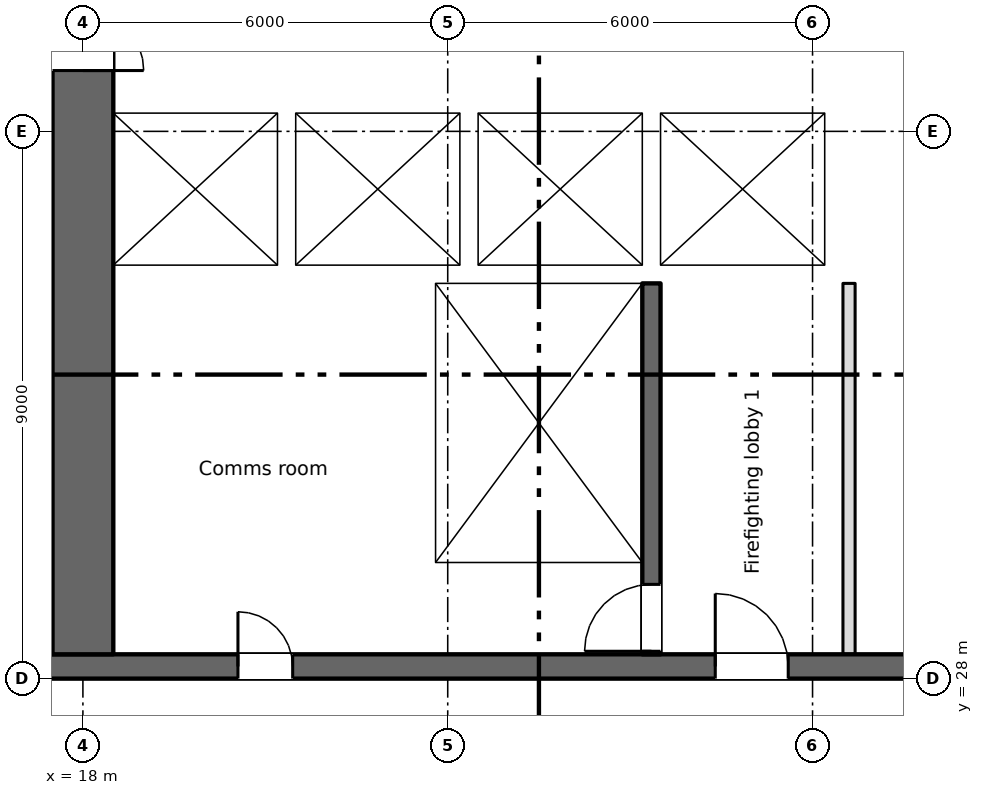
"""IFC4 building model, lengths in metres.
Left out: names, types, materials, properties, quantities, classifications, styles, units other than length and angle.
Written with IfcOpenShell. Run it as: python <this file> out.ifc"""

import sys

from ifc_helpers import new_model, si_unit, direction, frame, frame_2d, origin, place, context, subcontext, project, spatial, rectangle, extrude, element, fill, save


model = new_model("IFC4")
c1 = context("Model", 3, precision=1e-05, world=origin(), true_north=direction((0.0, 1.0)))
c2 = subcontext(c1, "Body", "Model", "MODEL_VIEW")
j1 = project(units=[si_unit("LENGTHUNIT", "METRE"), si_unit("PLANEANGLEUNIT", "RADIAN")], contexts=[c1])
p1 = place(None, origin())
s1 = spatial("IfcSite", under=j1, at=p1, CompositionType="ELEMENT")
p2 = place(p1, origin())
s2 = spatial("IfcBuilding", under=s1, at=p2, CompositionType="ELEMENT")
p3 = place(p2, frame((0.0, 0.0, 56.25)))
s3 = spatial("IfcBuildingStorey", under=s2, at=p3, CompositionType="ELEMENT", Elevation=56.25)
p4 = place(p3, frame((6.7, 28.2, 0.0), z_axis=(0.0, 0.0, 1.0), x_axis=(1.0, 0.0, 0.0)))
e1 = element("IfcWall", 1, at=p4, inside=s3, PredefinedType="SHEAR", context=c2, shape_type="SweptSolid", body=[
    extrude(rectangle(XDim=57.8, YDim=0.4, at=frame_2d((28.9, 0.0))), origin(), (0.0, 0.0, 1.0), 3.35),
])
p5 = place(p4, frame((13.85, 0.0, 0.0)))
e2 = element("IfcOpeningElement", 2, at=p5, cuts=e1, PredefinedType="OPENING", context=c2, shape_type="SweptSolid", body=[
    extrude(rectangle(XDim=0.9, YDim=2.1, at=frame_2d((0.45, 1.05))), frame((0.0, 0.21, 0.0), z_axis=(0.0, -1.0, 0.0), x_axis=(1.0, 0.0, 0.0)), (0.0, 0.0, 1.0), 0.42),
])
p6 = place(p4, frame((48.562, 0.0, 0.0)))
e3 = element("IfcOpeningElement", 3, at=p6, cuts=e1, PredefinedType="OPENING", context=c2, shape_type="SweptSolid", body=[
    extrude(rectangle(XDim=0.9, YDim=2.1, at=frame_2d((0.45, 1.05))), frame((0.0, 0.21, 0.0), z_axis=(0.0, -1.0, 0.0), x_axis=(1.0, 0.0, 0.0)), (0.0, 0.0, 1.0), 0.42),
])
p7 = place(p4, frame((51.137, 0.0, 0.0)))
e4 = element("IfcOpeningElement", 4, at=p7, cuts=e1, PredefinedType="OPENING", context=c2, shape_type="SweptSolid", body=[
    extrude(rectangle(XDim=0.9, YDim=2.1, at=frame_2d((0.45, 1.05))), frame((0.0, 0.21, 0.0), z_axis=(0.0, -1.0, 0.0), x_axis=(1.0, 0.0, 0.0)), (0.0, 0.0, 1.0), 0.42),
])
p8 = place(p4, frame((1.35, 0.0, 0.0)))
e5 = element("IfcOpeningElement", 5, at=p8, cuts=e1, PredefinedType="OPENING", context=c2, shape_type="SweptSolid", body=[
    extrude(rectangle(XDim=0.9, YDim=2.1, at=frame_2d((0.45, 1.05))), frame((0.0, 0.21, 0.0), z_axis=(0.0, -1.0, 0.0), x_axis=(1.0, 0.0, 0.0)), (0.0, 0.0, 1.0), 0.42),
])
p9 = place(p4, frame((4.7, 0.0, 0.0)))
e6 = element("IfcOpeningElement", 6, at=p9, cuts=e1, PredefinedType="OPENING", context=c2, shape_type="SweptSolid", body=[
    extrude(rectangle(XDim=1.2, YDim=2.1, at=frame_2d((0.6, 1.05))), frame((0.0, 0.21, 0.0), z_axis=(0.0, -1.0, 0.0), x_axis=(1.0, 0.0, 0.0)), (0.0, 0.0, 1.0), 0.42),
])
p10 = place(p4, frame((31.7, 0.0, 0.0)))
e7 = element("IfcOpeningElement", 7, at=p10, cuts=e1, PredefinedType="OPENING", context=c2, shape_type="SweptSolid", body=[
    extrude(rectangle(XDim=1.2, YDim=2.1, at=frame_2d((0.6, 1.05))), frame((0.0, 0.21, 0.0), z_axis=(0.0, -1.0, 0.0), x_axis=(1.0, 0.0, 0.0)), (0.0, 0.0, 1.0), 0.42),
])
p11 = place(p4, frame((55.2, 0.0, 0.0)))
e8 = element("IfcOpeningElement", 8, at=p11, cuts=e1, PredefinedType="OPENING", context=c2, shape_type="SweptSolid", body=[
    extrude(rectangle(XDim=1.2, YDim=2.1, at=frame_2d((0.6, 1.05))), frame((0.0, 0.21, 0.0), z_axis=(0.0, -1.0, 0.0), x_axis=(1.0, 0.0, 0.0)), (0.0, 0.0, 1.0), 0.42),
])
p12 = place(p4, frame((21.7, 0.0, 0.0)))
e9 = element("IfcOpeningElement", 9, at=p12, cuts=e1, PredefinedType="OPENING", context=c2, shape_type="SweptSolid", body=[
    extrude(rectangle(XDim=1.2, YDim=2.1, at=frame_2d((0.6, 1.05))), frame((0.0, 0.21, 0.0), z_axis=(0.0, -1.0, 0.0), x_axis=(1.0, 0.0, 0.0)), (0.0, 0.0, 1.0), 0.42),
])
p13 = place(p4, frame((41.7, 0.0, 0.0)))
e10 = element("IfcOpeningElement", 10, at=p13, cuts=e1, PredefinedType="OPENING", context=c2, shape_type="SweptSolid", body=[
    extrude(rectangle(XDim=1.2, YDim=2.1, at=frame_2d((0.6, 1.05))), frame((0.0, 0.21, 0.0), z_axis=(0.0, -1.0, 0.0), x_axis=(1.0, 0.0, 0.0)), (0.0, 0.0, 1.0), 0.42),
])
p14 = place(p4, frame((24.85, 0.0, 0.0)))
e11 = element("IfcOpeningElement", 11, at=p14, cuts=e1, PredefinedType="OPENING", context=c2, shape_type="SweptSolid", body=[
    extrude(rectangle(XDim=2.4, YDim=2.1, at=frame_2d((1.2, 1.05))), frame((0.0, 0.21, 0.0), z_axis=(0.0, -1.0, 0.0), x_axis=(1.0, 0.0, 0.0)), (0.0, 0.0, 1.0), 0.42),
])
p15 = place(p4, frame((37.35, 0.0, 0.0)))
e12 = element("IfcOpeningElement", 12, at=p15, cuts=e1, PredefinedType="OPENING", context=c2, shape_type="SweptSolid", body=[
    extrude(rectangle(XDim=2.4, YDim=2.1, at=frame_2d((1.2, 1.05))), frame((0.0, 0.21, 0.0), z_axis=(0.0, -1.0, 0.0), x_axis=(1.0, 0.0, 0.0)), (0.0, 0.0, 1.0), 0.42),
])
p16 = place(p4, frame((7.85, 0.0, 0.0)))
e13 = element("IfcOpeningElement", 13, at=p16, cuts=e1, PredefinedType="OPENING", context=c2, shape_type="SweptSolid", body=[
    extrude(rectangle(XDim=2.4, YDim=2.1, at=frame_2d((1.2, 1.05))), frame((0.0, 0.21, 0.0), z_axis=(0.0, -1.0, 0.0), x_axis=(1.0, 0.0, 0.0)), (0.0, 0.0, 1.0), 0.42),
])
p17 = place(p4, frame((28.85, 0.0, 0.0)))
e14 = element("IfcOpeningElement", 14, at=p17, cuts=e1, PredefinedType="OPENING", context=c2, shape_type="SweptSolid", body=[
    extrude(rectangle(XDim=0.9, YDim=2.1, at=frame_2d((0.45, 1.05))), frame((0.0, 0.21, 0.0), z_axis=(0.0, -1.0, 0.0), x_axis=(1.0, 0.0, 0.0)), (0.0, 0.0, 1.0), 0.42),
])
p18 = place(p4, frame((34.85, 0.0, 0.0)))
e15 = element("IfcOpeningElement", 15, at=p18, cuts=e1, PredefinedType="OPENING", context=c2, shape_type="SweptSolid", body=[
    extrude(rectangle(XDim=0.9, YDim=2.1, at=frame_2d((0.45, 1.05))), frame((0.0, 0.21, 0.0), z_axis=(0.0, -1.0, 0.0), x_axis=(1.0, 0.0, 0.0)), (0.0, 0.0, 1.0), 0.42),
])
p19 = place(p3, frame((18.0, 28.4, 0.0), z_axis=(0.0, 0.0, 1.0), x_axis=(0.0, 1.0, 0.0)))
e16 = element("IfcWall", 16, at=p19, inside=s3, PredefinedType="SHEAR", context=c2, shape_type="SweptSolid", body=[
    extrude(rectangle(XDim=16.6, YDim=1.0, at=frame_2d((8.3, 0.0))), origin(), (0.0, 0.0, 1.0), 3.35),
])
p20 = place(p19, frame((9.6, 0.0, 0.0)))
e17 = element("IfcOpeningElement", 17, at=p20, cuts=e16, PredefinedType="OPENING", context=c2, shape_type="SweptSolid", body=[
    extrude(rectangle(XDim=2.0, YDim=2.1, at=frame_2d((1.0, 1.05))), frame((0.0, 0.51, 0.0), z_axis=(0.0, -1.0, 0.0), x_axis=(1.0, 0.0, 0.0)), (0.0, 0.0, 1.0), 1.02),
])
p21 = place(p19, frame((15.25, 0.0, 0.0)))
e18 = element("IfcOpeningElement", 18, at=p21, cuts=e16, PredefinedType="OPENING", context=c2, shape_type="SweptSolid", body=[
    extrude(rectangle(XDim=1.2, YDim=2.1, at=frame_2d((0.6, 1.05))), frame((0.0, 0.51, 0.0), z_axis=(0.0, -1.0, 0.0), x_axis=(1.0, 0.0, 0.0)), (0.0, 0.0, 1.0), 1.02),
])
p22 = place(p3, frame((23.65, 28.4, 0.0), z_axis=(0.0, 0.0, 1.0), x_axis=(0.0, 1.0, 0.0)))
e19 = element("IfcWall", 19, at=p22, inside=s3, PredefinedType="SHEAR", context=c2, shape_type="SweptSolid", body=[
    extrude(rectangle(XDim=6.1, YDim=0.3, at=frame_2d((3.05, 0.0))), origin(), (0.0, 0.0, 1.0), 3.35),
])
p23 = place(p3, frame((27.35, 28.4, 0.0), z_axis=(0.0, 0.0, 1.0), x_axis=(0.0, 1.0, 0.0)))
e20 = element("IfcWall", 20, at=p23, inside=s3, PredefinedType="SHEAR", context=c2, shape_type="SweptSolid", body=[
    extrude(rectangle(XDim=6.1, YDim=0.3, at=frame_2d((3.05, 0.0))), origin(), (0.0, 0.0, 1.0), 3.35),
])
p24 = place(p23, frame((0.05, 0.0, 0.0)))
e21 = element("IfcOpeningElement", 21, at=p24, cuts=e20, PredefinedType="OPENING", context=c2, shape_type="SweptSolid", body=[
    extrude(rectangle(XDim=1.1, YDim=2.1, at=frame_2d((0.55, 1.05))), frame((0.0, 0.16, 0.0), z_axis=(0.0, -1.0, 0.0), x_axis=(1.0, 0.0, 0.0)), (0.0, 0.0, 1.0), 0.32),
])
p25 = place(p3, frame((18.5, 34.65, 0.0), z_axis=(0.0, 0.0, 1.0), x_axis=(1.0, 0.0, 0.0)))
e22 = element("IfcWall", 22, at=p25, inside=s3, PredefinedType="SHEAR", context=c2, shape_type="SweptSolid", body=[
    extrude(rectangle(XDim=12.2, YDim=0.3, at=frame_2d((6.1, 0.0))), origin(), (0.0, 0.0, 1.0), 3.35),
])
p26 = place(p25, frame((9.8, 0.0, 0.0)))
e23 = element("IfcOpeningElement", 23, at=p26, cuts=e22, PredefinedType="OPENING", context=c2, shape_type="SweptSolid", body=[
    extrude(rectangle(XDim=1.1, YDim=2.1, at=frame_2d((0.55, 1.05))), frame((0.0, 0.16, 0.0), z_axis=(0.0, -1.0, 0.0), x_axis=(1.0, 0.0, 0.0)), (0.0, 0.0, 1.0), 0.32),
])
p27 = place(p3, frame((18.5, 37.45, 0.0), z_axis=(0.0, 0.0, 1.0), x_axis=(1.0, 0.0, 0.0)))
e24 = element("IfcWall", 24, at=p27, inside=s3, PredefinedType="SHEAR", context=c2, shape_type="SweptSolid", body=[
    extrude(rectangle(XDim=12.2, YDim=0.3, at=frame_2d((6.1, 0.0))), origin(), (0.0, 0.0, 1.0), 3.35),
])
p28 = place(p27, frame((0.8, 0.0, 0.0)))
e25 = element("IfcOpeningElement", 25, at=p28, cuts=e24, PredefinedType="OPENING", context=c2, shape_type="SweptSolid", body=[
    extrude(rectangle(XDim=1.1, YDim=2.1, at=frame_2d((0.55, 1.05))), frame((0.0, 0.16, 0.0), z_axis=(0.0, -1.0, 0.0), x_axis=(1.0, 0.0, 0.0)), (0.0, 0.0, 1.0), 0.32),
])
p29 = place(p27, frame((3.8, 0.0, 0.0)))
e26 = element("IfcOpeningElement", 26, at=p29, cuts=e24, PredefinedType="OPENING", context=c2, shape_type="SweptSolid", body=[
    extrude(rectangle(XDim=1.1, YDim=2.1, at=frame_2d((0.55, 1.05))), frame((0.0, 0.16, 0.0), z_axis=(0.0, -1.0, 0.0), x_axis=(1.0, 0.0, 0.0)), (0.0, 0.0, 1.0), 0.32),
])
p30 = place(p27, frame((6.8, 0.0, 0.0)))
e27 = element("IfcOpeningElement", 27, at=p30, cuts=e24, PredefinedType="OPENING", context=c2, shape_type="SweptSolid", body=[
    extrude(rectangle(XDim=1.1, YDim=2.1, at=frame_2d((0.55, 1.05))), frame((0.0, 0.16, 0.0), z_axis=(0.0, -1.0, 0.0), x_axis=(1.0, 0.0, 0.0)), (0.0, 0.0, 1.0), 0.32),
])
p31 = place(p3, frame((27.35, 34.8, 0.0), z_axis=(0.0, 0.0, 1.0), x_axis=(0.0, 1.0, 0.0)))
e28 = element("IfcWall", 28, at=p31, inside=s3, PredefinedType="SHEAR", context=c2, shape_type="SweptSolid", body=[
    extrude(rectangle(XDim=2.5, YDim=0.3, at=frame_2d((1.25, 0.0))), origin(), (0.0, 0.0, 1.0), 3.35),
])
p32 = place(p3, frame((30.45, 34.8, 0.0), z_axis=(0.0, 0.0, 1.0), x_axis=(0.0, 1.0, 0.0)))
e29 = element("IfcWall", 29, at=p32, inside=s3, PredefinedType="SHEAR", context=c2, shape_type="SweptSolid", body=[
    extrude(rectangle(XDim=2.5, YDim=0.5, at=frame_2d((1.25, 0.0))), origin(), (0.0, 0.0, 1.0), 3.35),
])
for number, where, z_axis, x_axis in (
    (30, (21.35, 34.8, 0.0), (0.0, 0.0, 1.0), (0.0, 1.0, 0.0)),
    (31, (24.35, 34.8, 0.0), (0.0, 0.0, 1.0), (0.0, 1.0, 0.0)),
):
    element("IfcWall", number, at=place(p3, frame(where, z_axis=z_axis, x_axis=x_axis)), inside=s3, PredefinedType="SHEAR", context=c2, shape_type="SweptSolid", body=[
        extrude(rectangle(XDim=2.5, YDim=0.3, at=frame_2d((1.25, 0.0))), origin(), (0.0, 0.0, 1.0), 3.35),
    ])
p33 = place(p3, frame((30.6, 28.4, 0.0), z_axis=(0.0, 0.0, 1.0), x_axis=(0.0, 1.0, 0.0)))
e32 = element("IfcWall", 32, at=p33, inside=s3, PredefinedType="PARTITIONING", context=c2, shape_type="SweptSolid", body=[
    extrude(rectangle(XDim=6.1, YDim=0.2, at=frame_2d((3.05, 0.0))), origin(), (0.0, 0.0, 1.0), 3.35),
])
p34 = place(p5, origin())
e33 = element("IfcDoor", 33, at=p34, inside=s3, OperationType="SINGLE_SWING_LEFT", PredefinedType="DOOR", context=c2, shape_type="SweptSolid", body=[
    extrude(rectangle(XDim=0.9, YDim=2.1, at=frame_2d((0.45, 1.05))), frame((0.0, 0.025, 0.0), z_axis=(0.0, -1.0, 0.0), x_axis=(1.0, 0.0, 0.0)), (0.0, 0.0, 1.0), 0.05),
])
fill(e2, e33)
p35 = place(p28, origin())
e34 = element("IfcDoor", 34, at=p35, inside=s3, OperationType="SLIDING_TO_LEFT", PredefinedType="DOOR", context=c2, shape_type="SweptSolid", body=[
    extrude(rectangle(XDim=1.1, YDim=2.1, at=frame_2d((0.55, 1.05))), frame((0.0, 0.025, 0.0), z_axis=(0.0, -1.0, 0.0), x_axis=(1.0, 0.0, 0.0)), (0.0, 0.0, 1.0), 0.05),
])
fill(e25, e34)
p36 = place(p29, origin())
e35 = element("IfcDoor", 35, at=p36, inside=s3, OperationType="SLIDING_TO_LEFT", PredefinedType="DOOR", context=c2, shape_type="SweptSolid", body=[
    extrude(rectangle(XDim=1.1, YDim=2.1, at=frame_2d((0.55, 1.05))), frame((0.0, 0.025, 0.0), z_axis=(0.0, -1.0, 0.0), x_axis=(1.0, 0.0, 0.0)), (0.0, 0.0, 1.0), 0.05),
])
fill(e26, e35)
p37 = place(p30, origin())
e36 = element("IfcDoor", 36, at=p37, inside=s3, OperationType="SLIDING_TO_LEFT", PredefinedType="DOOR", context=c2, shape_type="SweptSolid", body=[
    extrude(rectangle(XDim=1.1, YDim=2.1, at=frame_2d((0.55, 1.05))), frame((0.0, 0.025, 0.0), z_axis=(0.0, -1.0, 0.0), x_axis=(1.0, 0.0, 0.0)), (0.0, 0.0, 1.0), 0.05),
])
fill(e27, e36)
p38 = place(p26, origin())
e37 = element("IfcDoor", 37, at=p38, inside=s3, OperationType="SLIDING_TO_LEFT", PredefinedType="DOOR", context=c2, shape_type="SweptSolid", body=[
    extrude(rectangle(XDim=1.1, YDim=2.1, at=frame_2d((0.55, 1.05))), frame((0.0, 0.025, 0.0), z_axis=(0.0, -1.0, 0.0), x_axis=(1.0, 0.0, 0.0)), (0.0, 0.0, 1.0), 0.05),
])
fill(e23, e37)
p39 = place(p24, origin())
e38 = element("IfcDoor", 38, at=p39, inside=s3, OperationType="SINGLE_SWING_LEFT", PredefinedType="DOOR", context=c2, shape_type="SweptSolid", body=[
    extrude(rectangle(XDim=1.1, YDim=2.1, at=frame_2d((0.55, 1.05))), frame((0.0, 0.025, 0.0), z_axis=(0.0, -1.0, 0.0), x_axis=(1.0, 0.0, 0.0)), (0.0, 0.0, 1.0), 0.05),
])
fill(e21, e38)
p40 = place(p12, origin())
e39 = element("IfcDoor", 39, at=p40, inside=s3, OperationType="SINGLE_SWING_LEFT", PredefinedType="DOOR", context=c2, shape_type="SweptSolid", body=[
    extrude(rectangle(XDim=1.2, YDim=2.1, at=frame_2d((0.6, 1.05))), frame((0.0, 0.025, 0.0), z_axis=(0.0, -1.0, 0.0), x_axis=(1.0, 0.0, 0.0)), (0.0, 0.0, 1.0), 0.05),
])
fill(e9, e39)
p41 = place(p20, origin())
e40 = element("IfcDoor", 40, at=p41, inside=s3, OperationType="DOUBLE_DOOR_SINGLE_SWING", PredefinedType="DOOR", context=c2, shape_type="SweptSolid", body=[
    extrude(rectangle(XDim=2.0, YDim=2.1, at=frame_2d((1.0, 1.05))), frame((0.0, 0.025, 0.0), z_axis=(0.0, -1.0, 0.0), x_axis=(1.0, 0.0, 0.0)), (0.0, 0.0, 1.0), 0.05),
])
fill(e17, e40)
save(model, sys.argv[1])
